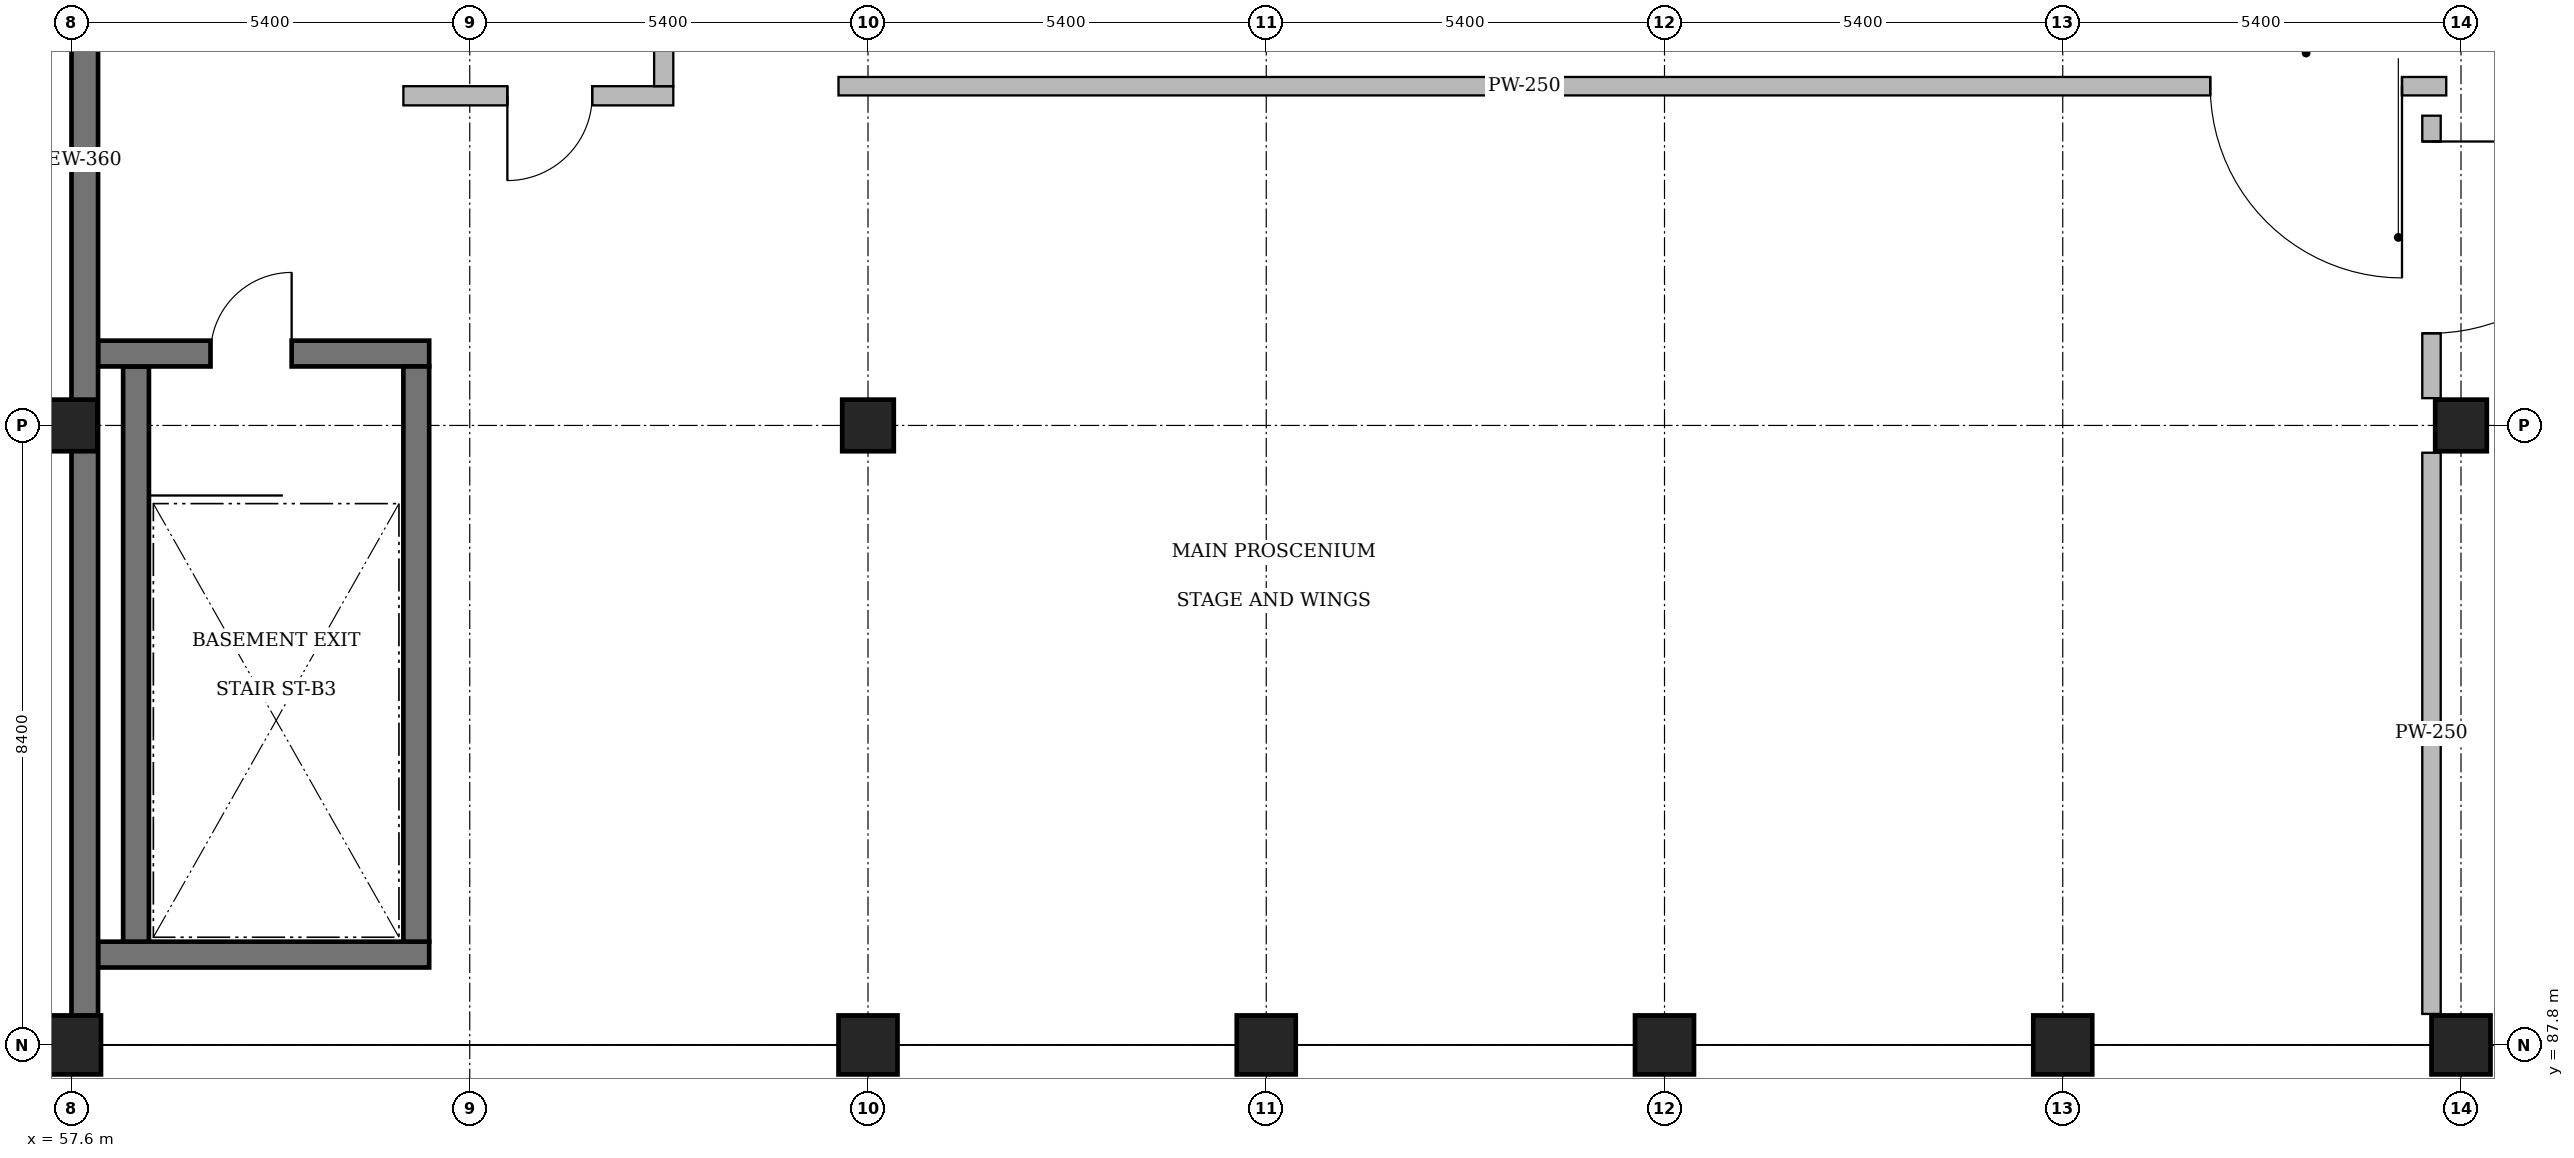
"""IFC4 building model, lengths in metres.
Left out: names, types, materials, properties, quantities, classifications, styles, units other than length and angle.
Written with IfcOpenShell. Run it as: python <this file> out.ifc"""

import sys

from ifc_helpers import new_model, si_unit, direction, frame, frame_2d, origin, origin_2d, place, context, subcontext, project, spatial, rectangle, extrude, element, fill, save


model = new_model("IFC4")
c1 = context("Model", 3, precision=1e-05, world=origin(), true_north=direction((0.0, 1.0)))
c2 = subcontext(c1, "Body", "Model", "MODEL_VIEW")
j1 = project(units=[si_unit("LENGTHUNIT", "METRE"), si_unit("PLANEANGLEUNIT", "RADIAN")], contexts=[c1])
p1 = place(None, origin())
s1 = spatial("IfcSite", under=j1, at=p1, CompositionType="ELEMENT")
p2 = place(p1, origin())
s2 = spatial("IfcBuilding", under=s1, at=p2, CompositionType="ELEMENT")
p3 = place(p2, origin())
s3 = spatial("IfcBuildingStorey", under=s2, at=p3, CompositionType="ELEMENT", Elevation=0.0)
p4 = place(p3, frame((68.4, 87.8, 0.0), z_axis=(0.0, 0.0, 1.0), x_axis=(1.0, 0.0, 0.0)))
e1 = element("IfcColumn", 1, at=p4, inside=s3, PredefinedType="COLUMN", context=c2, shape_type="SweptSolid", body=[
    extrude(rectangle(XDim=0.8, YDim=0.8, at=origin_2d()), origin(), (0.0, 0.0, 1.0), 4.8),
])
p5 = place(p3, frame((68.4, 96.2, 0.0), z_axis=(0.0, 0.0, 1.0), x_axis=(1.0, 0.0, 0.0)))
e2 = element("IfcColumn", 2, at=p5, inside=s3, PredefinedType="COLUMN", context=c2, shape_type="SweptSolid", body=[
    extrude(rectangle(XDim=0.7, YDim=0.7, at=origin_2d()), origin(), (0.0, 0.0, 1.0), 4.8),
])
for number, where, z_axis, x_axis in (
    (3, (73.8, 87.8, 0.0), (0.0, 0.0, 1.0), (1.0, 0.0, 0.0)),
    (4, (79.2, 87.8, 0.0), (0.0, 0.0, 1.0), (1.0, 0.0, 0.0)),
    (5, (84.6, 87.8, 0.0), (0.0, 0.0, 1.0), (1.0, 0.0, 0.0)),
    (6, (90.0, 87.8, 0.0), (0.0, 0.0, 1.0), (1.0, 0.0, 0.0)),
):
    element("IfcColumn", number, at=place(p3, frame(where, z_axis=z_axis, x_axis=x_axis)), inside=s3, PredefinedType="COLUMN", context=c2, shape_type="SweptSolid", body=[
        extrude(rectangle(XDim=0.8, YDim=0.8, at=origin_2d()), origin(), (0.0, 0.0, 1.0), 4.8),
    ])
p6 = place(p3, frame((90.0, 96.2, 0.0), z_axis=(0.0, 0.0, 1.0), x_axis=(1.0, 0.0, 0.0)))
e7 = element("IfcColumn", 7, at=p6, inside=s3, PredefinedType="COLUMN", context=c2, shape_type="SweptSolid", body=[
    extrude(rectangle(XDim=0.7, YDim=0.7, at=origin_2d()), origin(), (0.0, 0.0, 1.0), 4.8),
])
p7 = place(p3, frame((57.6, 87.8, 0.0), z_axis=(0.0, 0.0, 1.0), x_axis=(1.0, 0.0, 0.0)))
e8 = element("IfcColumn", 8, at=p7, inside=s3, PredefinedType="COLUMN", context=c2, shape_type="SweptSolid", body=[
    extrude(rectangle(XDim=0.8, YDim=0.8, at=origin_2d()), origin(), (0.0, 0.0, 1.0), 4.8),
])
p8 = place(p3, frame((57.6, 96.2, 0.0), z_axis=(0.0, 0.0, 1.0), x_axis=(1.0, 0.0, 0.0)))
e9 = element("IfcColumn", 9, at=p8, inside=s3, PredefinedType="COLUMN", context=c2, shape_type="SweptSolid", body=[
    extrude(rectangle(XDim=0.7, YDim=0.7, at=origin_2d()), origin(), (0.0, 0.0, 1.0), 4.8),
])
p9 = place(p3, frame((62.45, 89.025, 0.0), z_axis=(0.0, 0.0, 1.0), x_axis=(-1.0, 0.0, 0.0)))
e10 = element("IfcWall", 10, at=p9, inside=s3, PredefinedType="SOLIDWALL", context=c2, shape_type="SweptSolid", body=[
    extrude(rectangle(XDim=4.49, YDim=0.35, at=frame_2d((2.245, 0.0))), origin(), (0.0, 0.0, 1.0), 4.54),
])
p10 = place(p3, frame((58.475, 89.2, 0.0), z_axis=(0.0, 0.0, 1.0), x_axis=(0.0, 1.0, 0.0)))
e11 = element("IfcWall", 11, at=p10, inside=s3, PredefinedType="SOLIDWALL", context=c2, shape_type="SweptSolid", body=[
    extrude(rectangle(XDim=7.8, YDim=0.35, at=frame_2d((3.9, 0.0))), origin(), (0.0, 0.0, 1.0), 4.54),
])
p11 = place(p3, frame((57.96, 97.175, 0.0), z_axis=(0.0, 0.0, 1.0), x_axis=(1.0, 0.0, 0.0)))
e12 = element("IfcWall", 12, at=p11, inside=s3, PredefinedType="SOLIDWALL", context=c2, shape_type="SweptSolid", body=[
    extrude(rectangle(XDim=4.49, YDim=0.35, at=frame_2d((2.245, 0.0))), origin(), (0.0, 0.0, 1.0), 4.54),
])
p12 = place(p11, frame((1.525, 0.0, 0.0)))
e13 = element("IfcOpeningElement", 13, at=p12, cuts=e12, PredefinedType="OPENING", context=c2, shape_type="SweptSolid", body=[
    extrude(rectangle(XDim=1.1, YDim=2.15, at=frame_2d((0.55, 1.075))), frame((0.0, 0.195, 0.0), z_axis=(0.0, -1.0, 0.0), x_axis=(1.0, 0.0, 0.0)), (0.0, 0.0, 1.0), 0.39),
])
p13 = place(p3, frame((62.275, 97.0, 0.0), z_axis=(0.0, 0.0, 1.0), x_axis=(0.0, -1.0, 0.0)))
e14 = element("IfcWall", 14, at=p13, inside=s3, PredefinedType="SOLIDWALL", context=c2, shape_type="SweptSolid", body=[
    extrude(rectangle(XDim=7.8, YDim=0.35, at=frame_2d((3.9, 0.0))), origin(), (0.0, 0.0, 1.0), 4.54),
])
p14 = place(p3, frame((65.76, 100.67, 0.0), z_axis=(0.0, 0.0, 1.0), x_axis=(-1.0, 0.0, 0.0)))
e15 = element("IfcWall", 15, at=p14, inside=s3, PredefinedType="SOLIDWALL", context=c2, shape_type="SweptSolid", body=[
    extrude(rectangle(XDim=3.66, YDim=0.26, at=frame_2d((1.83, 0.0))), origin(), (0.0, 0.0, 1.0), 4.54),
])
p15 = place(p14, frame((1.1, 0.0, 0.0)))
e16 = element("IfcOpeningElement", 16, at=p15, cuts=e15, PredefinedType="OPENING", context=c2, shape_type="SweptSolid", body=[
    extrude(rectangle(XDim=1.15, YDim=2.2, at=frame_2d((0.575, 1.1))), frame((0.0, 0.15, 0.0), z_axis=(0.0, -1.0, 0.0), x_axis=(1.0, 0.0, 0.0)), (0.0, 0.0, 1.0), 0.3),
])
p16 = place(p3, frame((65.63, 106.65, 0.0), z_axis=(0.0, 0.0, 1.0), x_axis=(0.0, -1.0, 0.0)))
e17 = element("IfcWall", 17, at=p16, inside=s3, PredefinedType="SOLIDWALL", context=c2, shape_type="SweptSolid", body=[
    extrude(rectangle(XDim=5.85, YDim=0.26, at=frame_2d((2.925, 0.0))), origin(), (0.0, 0.0, 1.0), 4.54),
])
p17 = place(p3, frame((57.78, 87.8, 0.0), z_axis=(0.0, 0.0, 1.0), x_axis=(0.0, 1.0, 0.0)))
e18 = element("IfcWall", 18, at=p17, inside=s3, PredefinedType="SOLIDWALL", context=c2, shape_type="SweptSolid", body=[
    extrude(rectangle(XDim=24.0, YDim=0.36, at=frame_2d((12.0, 0.0))), origin(), (0.0, 0.0, 1.0), 4.54),
])
p18 = place(p3, frame((89.6, 100.4, 0.0), z_axis=(0.0, 0.0, 1.0), x_axis=(0.0, -1.0, 0.0)))
e19 = element("IfcWall", 19, at=p18, inside=s3, PredefinedType="PARTITIONING", context=c2, shape_type="SweptSolid", body=[
    extrude(rectangle(XDim=3.83, YDim=0.25, at=frame_2d((1.915, 0.0))), origin(), (0.0, 0.0, 1.0), 4.54),
])
p19 = place(p18, frame((0.35, 0.0, 0.0)))
e20 = element("IfcOpeningElement", 20, at=p19, cuts=e19, PredefinedType="OPENING", context=c2, shape_type="SweptSolid", body=[
    extrude(rectangle(XDim=2.6, YDim=3.2, at=frame_2d((1.3, 1.6))), frame((0.0, 0.145, 0.0), z_axis=(0.0, -1.0, 0.0), x_axis=(1.0, 0.0, 0.0)), (0.0, 0.0, 1.0), 0.29),
])
p20 = place(p3, frame((89.6, 95.83, 0.0), z_axis=(0.0, 0.0, 1.0), x_axis=(0.0, -1.0, 0.0)))
e21 = element("IfcWall", 21, at=p20, inside=s3, PredefinedType="PARTITIONING", context=c2, shape_type="SweptSolid", body=[
    extrude(rectangle(XDim=7.61, YDim=0.25, at=frame_2d((3.805, 0.0))), origin(), (0.0, 0.0, 1.0), 4.16),
])
p21 = place(p3, frame((89.8, 100.8, 0.0), z_axis=(0.0, 0.0, 1.0), x_axis=(-1.0, 0.0, 0.0)))
e22 = element("IfcWall", 22, at=p21, inside=s3, PredefinedType="PARTITIONING", context=c2, shape_type="SweptSolid", body=[
    extrude(rectangle(XDim=21.8, YDim=0.25, at=frame_2d((10.9, 0.0))), origin(), (0.0, 0.0, 1.0), 4.56),
])
p22 = place(p21, frame((0.6, 0.0, 0.0)))
e23 = element("IfcOpeningElement", 23, at=p22, cuts=e22, PredefinedType="OPENING", context=c2, shape_type="SweptSolid", body=[
    extrude(rectangle(XDim=2.6, YDim=3.2, at=frame_2d((1.3, 1.6))), frame((0.0, 0.145, 0.0), z_axis=(0.0, -1.0, 0.0), x_axis=(1.0, 0.0, 0.0)), (0.0, 0.0, 1.0), 0.29),
])
p23 = place(p12, origin())
e24 = element("IfcDoor", 24, at=p23, inside=s3, OperationType="SINGLE_SWING_RIGHT", PredefinedType="DOOR", context=c2, shape_type="SweptSolid", body=[
    extrude(rectangle(XDim=1.1, YDim=2.15, at=frame_2d((0.55, 1.075))), frame((0.0, 0.025, 0.0), z_axis=(0.0, -1.0, 0.0), x_axis=(1.0, 0.0, 0.0)), (0.0, 0.0, 1.0), 0.05),
])
fill(e13, e24)
p24 = place(p15, origin())
e25 = element("IfcDoor", 25, at=p24, inside=s3, OperationType="SINGLE_SWING_RIGHT", PredefinedType="DOOR", context=c2, shape_type="SweptSolid", body=[
    extrude(rectangle(XDim=1.15, YDim=2.2, at=frame_2d((0.575, 1.1))), frame((0.0, 0.025, 0.0), z_axis=(0.0, -1.0, 0.0), x_axis=(1.0, 0.0, 0.0)), (0.0, 0.0, 1.0), 0.05),
])
fill(e16, e25)
p25 = place(p19, origin())
e26 = element("IfcDoor", 26, at=p25, inside=s3, OperationType="DOUBLE_DOOR_SINGLE_SWING", PredefinedType="DOOR", context=c2, shape_type="SweptSolid", body=[
    extrude(rectangle(XDim=2.6, YDim=3.2, at=frame_2d((1.3, 1.6))), frame((0.0, 0.025, 0.0), z_axis=(0.0, -1.0, 0.0), x_axis=(1.0, 0.0, 0.0)), (0.0, 0.0, 1.0), 0.05),
])
fill(e20, e26)
p26 = place(p22, origin())
e27 = element("IfcDoor", 27, at=p26, inside=s3, OperationType="DOUBLE_DOOR_SINGLE_SWING", PredefinedType="DOOR", context=c2, shape_type="SweptSolid", body=[
    extrude(rectangle(XDim=2.6, YDim=3.2, at=frame_2d((1.3, 1.6))), frame((0.0, 0.025, 0.0), z_axis=(0.0, -1.0, 0.0), x_axis=(1.0, 0.0, 0.0)), (0.0, 0.0, 1.0), 0.05),
])
fill(e23, e27)
save(model, sys.argv[1])
